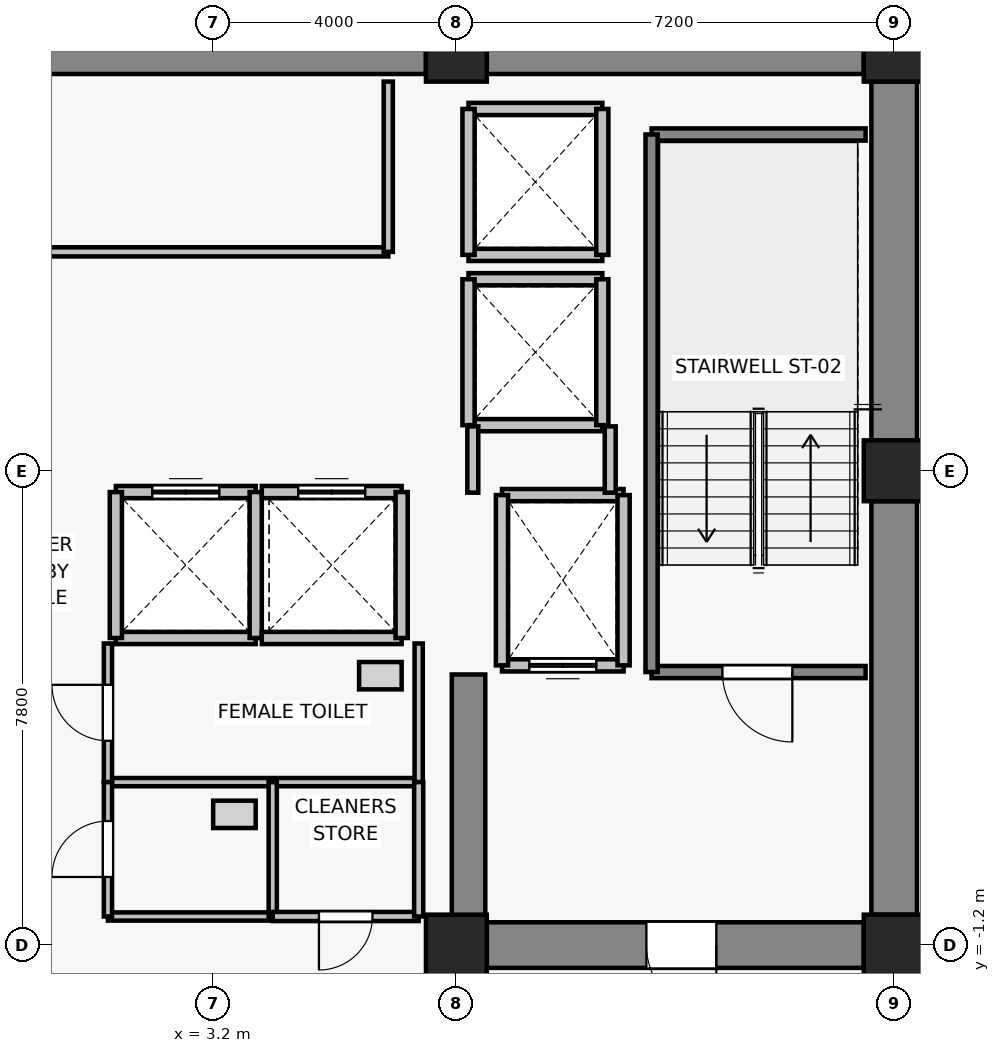
"""IFC4 building model, lengths in metres.
Left out: names, types, materials, properties, quantities, classifications, styles, units other than length and angle.
Written with IfcOpenShell. Run it as: python <this file> out.ifc"""

import sys

from ifc_helpers import new_model, si_unit, direction, frame, frame_2d, origin, origin_2d, place, context, subcontext, project, spatial, rectangle, extrude, source, transform, mapped, element, fill, save


model = new_model("IFC4")
c1 = context("Model", 3, precision=1e-05, world=origin(), true_north=direction((0.0, 1.0)))
c2 = subcontext(c1, "Body", "Model", "MODEL_VIEW")
j1 = project(units=[si_unit("LENGTHUNIT", "METRE"), si_unit("PLANEANGLEUNIT", "RADIAN")], contexts=[c1])
p1 = place(None, origin())
s1 = spatial("IfcSite", under=j1, at=p1, CompositionType="ELEMENT")
p2 = place(p1, origin())
s2 = spatial("IfcBuilding", under=s1, at=p2, CompositionType="ELEMENT")
p3 = place(p2, frame((0.0, 0.0, 169.3)))
s3 = spatial("IfcBuildingStorey", under=s2, at=p3, CompositionType="ELEMENT", Elevation=169.3)
for number, where, z_axis, x_axis in (
    (1, (7.2, -1.2, 0.0), (0.0, 0.0, 1.0), (1.0, 0.0, 0.0)),
    (2, (14.4, -1.2, 0.0), (0.0, 0.0, 1.0), (1.0, 0.0, 0.0)),
    (3, (14.4, 6.6, 0.0), (0.0, 0.0, 1.0), (1.0, 0.0, 0.0)),
    (4, (7.2, 13.5, 0.0), (0.0, 0.0, 1.0), (1.0, 0.0, 0.0)),
    (5, (14.4, 13.5, 0.0), (0.0, 0.0, 1.0), (1.0, 0.0, 0.0)),
):
    element("IfcColumn", number, at=place(p3, frame(where, z_axis=z_axis, x_axis=x_axis)), inside=s3, PredefinedType="COLUMN", context=c2, shape_type="SweptSolid", body=[
        extrude(rectangle(XDim=1.0, YDim=1.0, at=origin_2d()), origin(), (0.0, 0.0, 1.0), 3.3),
    ])
p4 = place(p3, frame((-6.7, 13.5, 0.0), z_axis=(0.0, 0.0, 1.0), x_axis=(1.0, 0.0, 0.0)))
e6 = element("IfcWall", 6, at=p4, inside=s3, PredefinedType="SHEAR", context=c2, shape_type="SweptSolid", body=[
    extrude(rectangle(XDim=13.4, YDim=0.75, at=frame_2d((6.7, 0.0))), origin(), (0.0, 0.0, 1.0), 3.075),
])
p5 = place(p3, frame((7.7, 13.5, 0.0), z_axis=(0.0, 0.0, 1.0), x_axis=(1.0, 0.0, 0.0)))
e7 = element("IfcWall", 7, at=p5, inside=s3, PredefinedType="SHEAR", context=c2, shape_type="SweptSolid", body=[
    extrude(rectangle(XDim=6.2, YDim=0.75, at=frame_2d((3.1, 0.0))), origin(), (0.0, 0.0, 1.0), 3.075),
])
p6 = place(p3, frame((14.4, -0.7, 0.0), z_axis=(0.0, 0.0, 1.0), x_axis=(0.0, 1.0, 0.0)))
e8 = element("IfcWall", 8, at=p6, inside=s3, PredefinedType="SHEAR", context=c2, shape_type="SweptSolid", body=[
    extrude(rectangle(XDim=6.8, YDim=0.75, at=frame_2d((3.4, 0.0))), origin(), (0.0, 0.0, 1.0), 3.075),
])
p7 = place(p3, frame((14.4, 7.1, 0.0), z_axis=(0.0, 0.0, 1.0), x_axis=(0.0, 1.0, 0.0)))
e9 = element("IfcWall", 9, at=p7, inside=s3, PredefinedType="SHEAR", context=c2, shape_type="SweptSolid", body=[
    extrude(rectangle(XDim=5.9, YDim=0.75, at=frame_2d((2.95, 0.0))), origin(), (0.0, 0.0, 1.0), 3.075),
])
p8 = place(p3, frame((13.9, -1.2, 0.0), z_axis=(0.0, 0.0, 1.0), x_axis=(-1.0, 0.0, 0.0)))
e10 = element("IfcWall", 10, at=p8, inside=s3, PredefinedType="SHEAR", context=c2, shape_type="SweptSolid", body=[
    extrude(rectangle(XDim=6.2, YDim=0.75, at=frame_2d((3.1, 0.0))), origin(), (0.0, 0.0, 1.0), 3.075),
])
p9 = place(p8, frame((2.425, 0.0, 0.0)))
e11 = element("IfcOpeningElement", 11, at=p9, cuts=e10, PredefinedType="OPENING", context=c2, shape_type="SweptSolid", body=[
    extrude(rectangle(XDim=1.15, YDim=2.15, at=frame_2d((0.575, 1.075))), frame((0.0, 0.385, 0.0), z_axis=(0.0, -1.0, 0.0), x_axis=(1.0, 0.0, 0.0)), (0.0, 0.0, 1.0), 0.77),
])
p10 = place(p3, frame((7.4, -0.825, 0.0), z_axis=(0.0, 0.0, 1.0), x_axis=(0.0, 1.0, 0.0)))
e12 = element("IfcWall", 12, at=p10, inside=s3, PredefinedType="SHEAR", context=c2, shape_type="SweptSolid", body=[
    extrude(rectangle(XDim=4.075, YDim=0.55, at=frame_2d((2.038, 0.0))), origin(), (0.0, 0.0, 1.0), 3.075),
])
p11 = place(p3, frame((9.95, 3.4, 0.0), z_axis=(0.0, 0.0, 1.0), x_axis=(-1.0, 0.0, 0.0)))
e13 = element("IfcWall", 13, at=p11, inside=s3, PredefinedType="SOLIDWALL", context=c2, shape_type="SweptSolid", body=[
    extrude(rectangle(XDim=2.0, YDim=0.2, at=frame_2d((1.0, 0.0))), origin(), (0.0, 0.0, 1.0), 3.075),
])
p12 = place(p11, frame((0.45, 0.0, 0.0)))
e14 = element("IfcOpeningElement", 14, at=p12, cuts=e13, PredefinedType="OPENING", context=c2, shape_type="SweptSolid", body=[
    extrude(rectangle(XDim=1.1, YDim=2.2, at=frame_2d((0.55, 1.1))), frame((0.0, 0.11, 0.0), z_axis=(0.0, -1.0, 0.0), x_axis=(1.0, 0.0, 0.0)), (0.0, 0.0, 1.0), 0.22),
])
p13 = place(p3, frame((7.95, 6.2, 0.0), z_axis=(0.0, 0.0, 1.0), x_axis=(1.0, 0.0, 0.0)))
e15 = element("IfcWall", 15, at=p13, inside=s3, PredefinedType="SOLIDWALL", context=c2, shape_type="SweptSolid", body=[
    extrude(rectangle(XDim=2.0, YDim=0.2, at=frame_2d((1.0, 0.0))), origin(), (0.0, 0.0, 1.0), 3.075),
])
for number, where, z_axis, x_axis in (
    (16, (7.95, 3.4, 0.0), (0.0, 0.0, 1.0), (0.0, 1.0, 0.0)),
    (17, (9.95, 6.2, 0.0), (0.0, 0.0, 1.0), (0.0, -1.0, 0.0)),
):
    element("IfcWall", number, at=place(p3, frame(where, z_axis=z_axis, x_axis=x_axis)), inside=s3, PredefinedType="SOLIDWALL", context=c2, shape_type="SweptSolid", body=[
        extrude(rectangle(XDim=2.8, YDim=0.2, at=frame_2d((1.4, 0.0))), origin(), (0.0, 0.0, 1.0), 3.075),
    ])
p14 = place(p3, frame((3.9, 3.85, 0.0), z_axis=(0.0, 0.0, 1.0), x_axis=(-1.0, 0.0, 0.0)))
e18 = element("IfcWall", 18, at=p14, inside=s3, PredefinedType="SOLIDWALL", context=c2, shape_type="SweptSolid", body=[
    extrude(rectangle(XDim=2.3, YDim=0.2, at=frame_2d((1.15, 0.0))), origin(), (0.0, 0.0, 1.0), 3.075),
])
p15 = place(p3, frame((1.6, 6.25, 0.0), z_axis=(0.0, 0.0, 1.0), x_axis=(1.0, 0.0, 0.0)))
e19 = element("IfcWall", 19, at=p15, inside=s3, PredefinedType="SOLIDWALL", context=c2, shape_type="SweptSolid", body=[
    extrude(rectangle(XDim=2.3, YDim=0.2, at=frame_2d((1.15, 0.0))), origin(), (0.0, 0.0, 1.0), 3.075),
])
p16 = place(p15, frame((0.6, 0.0, 0.0)))
e20 = element("IfcOpeningElement", 20, at=p16, cuts=e19, PredefinedType="OPENING", context=c2, shape_type="SweptSolid", body=[
    extrude(rectangle(XDim=1.1, YDim=2.2, at=frame_2d((0.55, 1.1))), frame((0.0, 0.11, 0.0), z_axis=(0.0, -1.0, 0.0), x_axis=(1.0, 0.0, 0.0)), (0.0, 0.0, 1.0), 0.22),
])
for number, where, z_axis, x_axis in (
    (21, (1.6, 3.85, 0.0), (0.0, 0.0, 1.0), (0.0, 1.0, 0.0)),
    (22, (3.9, 6.25, 0.0), (0.0, 0.0, 1.0), (0.0, -1.0, 0.0)),
):
    element("IfcWall", number, at=place(p3, frame(where, z_axis=z_axis, x_axis=x_axis)), inside=s3, PredefinedType="SOLIDWALL", context=c2, shape_type="SweptSolid", body=[
        extrude(rectangle(XDim=2.4, YDim=0.2, at=frame_2d((1.2, 0.0))), origin(), (0.0, 0.0, 1.0), 3.075),
    ])
p17 = place(p3, frame((6.3, 3.85, 0.0), z_axis=(0.0, 0.0, 1.0), x_axis=(-1.0, 0.0, 0.0)))
e23 = element("IfcWall", 23, at=p17, inside=s3, PredefinedType="SOLIDWALL", context=c2, shape_type="SweptSolid", body=[
    extrude(rectangle(XDim=2.3, YDim=0.2, at=frame_2d((1.15, 0.0))), origin(), (0.0, 0.0, 1.0), 3.075),
])
p18 = place(p3, frame((4.0, 6.25, 0.0), z_axis=(0.0, 0.0, 1.0), x_axis=(1.0, 0.0, 0.0)))
e24 = element("IfcWall", 24, at=p18, inside=s3, PredefinedType="SOLIDWALL", context=c2, shape_type="SweptSolid", body=[
    extrude(rectangle(XDim=2.3, YDim=0.2, at=frame_2d((1.15, 0.0))), origin(), (0.0, 0.0, 1.0), 3.075),
])
p19 = place(p18, frame((0.6, 0.0, 0.0)))
e25 = element("IfcOpeningElement", 25, at=p19, cuts=e24, PredefinedType="OPENING", context=c2, shape_type="SweptSolid", body=[
    extrude(rectangle(XDim=1.1, YDim=2.2, at=frame_2d((0.55, 1.1))), frame((0.0, 0.11, 0.0), z_axis=(0.0, -1.0, 0.0), x_axis=(1.0, 0.0, 0.0)), (0.0, 0.0, 1.0), 0.22),
])
p20 = place(p3, frame((6.3, 6.25, 0.0), z_axis=(0.0, 0.0, 1.0), x_axis=(0.0, -1.0, 0.0)))
e26 = element("IfcWall", 26, at=p20, inside=s3, PredefinedType="SOLIDWALL", context=c2, shape_type="SweptSolid", body=[
    extrude(rectangle(XDim=2.4, YDim=0.2, at=frame_2d((1.2, 0.0))), origin(), (0.0, 0.0, 1.0), 3.075),
])
for number, where, z_axis, x_axis in (
    (27, (9.6, 7.35, 0.0), (0.0, 0.0, 1.0), (-1.0, 0.0, 0.0)),
    (28, (7.4, 9.75, 0.0), (0.0, 0.0, 1.0), (1.0, 0.0, 0.0)),
):
    element("IfcWall", number, at=place(p3, frame(where, z_axis=z_axis, x_axis=x_axis)), inside=s3, PredefinedType="SOLIDWALL", context=c2, shape_type="SweptSolid", body=[
        extrude(rectangle(XDim=2.2, YDim=0.2, at=frame_2d((1.1, 0.0))), origin(), (0.0, 0.0, 1.0), 2.565),
    ])
p21 = place(p3, frame((7.4, 7.35, 0.0), z_axis=(0.0, 0.0, 1.0), x_axis=(0.0, 1.0, 0.0)))
e29 = element("IfcWall", 29, at=p21, inside=s3, PredefinedType="SOLIDWALL", context=c2, shape_type="SweptSolid", body=[
    extrude(rectangle(XDim=2.4, YDim=0.2, at=frame_2d((1.2, 0.0))), origin(), (0.0, 0.0, 1.0), 2.565),
])
p22 = place(p3, frame((9.6, 9.75, 0.0), z_axis=(0.0, 0.0, 1.0), x_axis=(0.0, -1.0, 0.0)))
e30 = element("IfcWall", 30, at=p22, inside=s3, PredefinedType="SOLIDWALL", context=c2, shape_type="SweptSolid", body=[
    extrude(rectangle(XDim=2.4, YDim=0.2, at=frame_2d((1.2, 0.0))), origin(), (0.0, 0.0, 1.0), 3.075),
])
for number, where, z_axis, x_axis in (
    (31, (9.6, 10.15, 0.0), (0.0, 0.0, 1.0), (-1.0, 0.0, 0.0)),
    (32, (7.4, 12.55, 0.0), (0.0, 0.0, 1.0), (1.0, 0.0, 0.0)),
):
    element("IfcWall", number, at=place(p3, frame(where, z_axis=z_axis, x_axis=x_axis)), inside=s3, PredefinedType="SOLIDWALL", context=c2, shape_type="SweptSolid", body=[
        extrude(rectangle(XDim=2.2, YDim=0.2, at=frame_2d((1.1, 0.0))), origin(), (0.0, 0.0, 1.0), 2.565),
    ])
p23 = place(p3, frame((7.4, 10.15, 0.0), z_axis=(0.0, 0.0, 1.0), x_axis=(0.0, 1.0, 0.0)))
e33 = element("IfcWall", 33, at=p23, inside=s3, PredefinedType="SOLIDWALL", context=c2, shape_type="SweptSolid", body=[
    extrude(rectangle(XDim=2.4, YDim=0.2, at=frame_2d((1.2, 0.0))), origin(), (0.0, 0.0, 1.0), 2.565),
])
p24 = place(p3, frame((9.6, 12.55, 0.0), z_axis=(0.0, 0.0, 1.0), x_axis=(0.0, -1.0, 0.0)))
e34 = element("IfcWall", 34, at=p24, inside=s3, PredefinedType="SOLIDWALL", context=c2, shape_type="SweptSolid", body=[
    extrude(rectangle(XDim=2.4, YDim=0.2, at=frame_2d((1.2, 0.0))), origin(), (0.0, 0.0, 1.0), 3.075),
])
p25 = place(p3, frame((13.93, 3.29, 0.0), z_axis=(0.0, 0.0, 1.0), x_axis=(-1.0, 0.0, 0.0)))
e35 = element("IfcWall", 35, at=p25, inside=s3, PredefinedType="SOLIDWALL", context=c2, shape_type="SweptSolid", body=[
    extrude(rectangle(XDim=3.52, YDim=0.2, at=frame_2d((1.76, 0.0))), origin(), (0.0, 0.0, 1.0), 3.075),
])
p26 = place(p25, frame((1.205, 0.0, 0.0)))
e36 = element("IfcOpeningElement", 36, at=p26, cuts=e35, PredefinedType="OPENING", context=c2, shape_type="SweptSolid", body=[
    extrude(rectangle(XDim=1.15, YDim=2.15, at=frame_2d((0.575, 1.075))), frame((0.0, 0.11, 0.0), z_axis=(0.0, -1.0, 0.0), x_axis=(1.0, 0.0, 0.0)), (0.0, 0.0, 1.0), 0.22),
])
p27 = place(p3, frame((10.41, 12.13, 0.0), z_axis=(0.0, 0.0, 1.0), x_axis=(1.0, 0.0, 0.0)))
e37 = element("IfcWall", 37, at=p27, inside=s3, PredefinedType="SOLIDWALL", context=c2, shape_type="SweptSolid", body=[
    extrude(rectangle(XDim=3.52, YDim=0.2, at=frame_2d((1.76, 0.0))), origin(), (0.0, 0.0, 1.0), 3.075),
])
p28 = place(p3, frame((10.41, 3.29, 0.0), z_axis=(0.0, 0.0, 1.0), x_axis=(0.0, 1.0, 0.0)))
e38 = element("IfcWall", 38, at=p28, inside=s3, PredefinedType="SOLIDWALL", context=c2, shape_type="SweptSolid", body=[
    extrude(rectangle(XDim=8.84, YDim=0.2, at=frame_2d((4.42, 0.0))), origin(), (0.0, 0.0, 1.0), 3.075),
])
p29 = place(p3, frame((7.47, 6.24, 0.0), z_axis=(0.0, 0.0, 1.0), x_axis=(0.0, 1.0, 0.0)))
e39 = element("IfcWall", 39, at=p29, inside=s3, PredefinedType="PARTITIONING", context=c2, shape_type="SweptSolid", body=[
    extrude(rectangle(XDim=1.09, YDim=0.18, at=frame_2d((0.545, 0.0))), origin(), (0.0, 0.0, 1.0), 2.565),
])
p30 = place(p3, frame((9.73, 7.33, 0.0), z_axis=(0.0, 0.0, 1.0), x_axis=(0.0, -1.0, 0.0)))
e40 = element("IfcWall", 40, at=p30, inside=s3, PredefinedType="PARTITIONING", context=c2, shape_type="SweptSolid", body=[
    extrude(rectangle(XDim=1.09, YDim=0.18, at=frame_2d((0.545, 0.0))), origin(), (0.0, 0.0, 1.0), 3.075),
])
p31 = place(p3, frame((6.08, 10.2, 0.0), z_axis=(0.0, 0.0, 1.0), x_axis=(-1.0, 0.0, 0.0)))
e41 = element("IfcWall", 41, at=p31, inside=s3, PredefinedType="PARTITIONING", context=c2, shape_type="SweptSolid", body=[
    extrude(rectangle(XDim=12.16, YDim=0.15, at=frame_2d((6.08, 0.0))), origin(), (0.0, 0.0, 1.0), 3.075),
])
p32 = place(p31, frame((7.005, 0.0, 0.0)))
e42 = element("IfcOpeningElement", 42, at=p32, cuts=e41, PredefinedType="OPENING", context=c2, shape_type="SweptSolid", body=[
    extrude(rectangle(XDim=1.15, YDim=2.15, at=frame_2d((0.575, 1.075))), frame((0.0, 0.085, 0.0), z_axis=(0.0, -1.0, 0.0), x_axis=(1.0, 0.0, 0.0)), (0.0, 0.0, 1.0), 0.17),
])
p33 = place(p3, frame((6.08, 13.0, 0.0), z_axis=(0.0, 0.0, 1.0), x_axis=(0.0, -1.0, 0.0)))
e43 = element("IfcWall", 43, at=p33, inside=s3, PredefinedType="PARTITIONING", context=c2, shape_type="SweptSolid", body=[
    extrude(rectangle(XDim=2.8, YDim=0.15, at=frame_2d((1.4, 0.0))), origin(), (0.0, 0.0, 1.0), 3.075),
])
p34 = place(p3, frame((6.58, 1.48, 0.0), z_axis=(0.0, 0.0, 1.0), x_axis=(-1.0, 0.0, 0.0)))
e44 = element("IfcWall", 44, at=p34, inside=s3, PredefinedType="PARTITIONING", context=c2, shape_type="SweptSolid", body=[
    extrude(rectangle(XDim=5.11, YDim=0.135, at=frame_2d((2.555, 0.0))), origin(), (0.0, 0.0, 1.0), 3.075),
])
p35 = place(p3, frame((1.47, 1.48, 0.0), z_axis=(0.0, 0.0, 1.0), x_axis=(0.0, 1.0, 0.0)))
e45 = element("IfcWall", 45, at=p35, inside=s3, PredefinedType="PARTITIONING", context=c2, shape_type="SweptSolid", body=[
    extrude(rectangle(XDim=2.28, YDim=0.135, at=frame_2d((1.14, 0.0))), origin(), (0.0, 0.0, 1.0), 3.075),
])
p36 = place(p35, frame((0.68, 0.0, 0.0)))
e46 = element("IfcOpeningElement", 46, at=p36, cuts=e45, PredefinedType="OPENING", context=c2, shape_type="SweptSolid", body=[
    extrude(rectangle(XDim=0.92, YDim=2.1, at=frame_2d((0.46, 1.05))), frame((0.0, 0.077, 0.0), z_axis=(0.0, -1.0, 0.0), x_axis=(1.0, 0.0, 0.0)), (0.0, 0.0, 1.0), 0.155),
])
p37 = place(p3, frame((6.58, 3.76, 0.0), z_axis=(0.0, 0.0, 1.0), x_axis=(0.0, -1.0, 0.0)))
e47 = element("IfcWall", 47, at=p37, inside=s3, PredefinedType="PARTITIONING", context=c2, shape_type="SweptSolid", body=[
    extrude(rectangle(XDim=2.28, YDim=0.135, at=frame_2d((1.14, 0.0))), origin(), (0.0, 0.0, 1.0), 3.075),
])
p38 = place(p3, frame((4.18, -0.73, 0.0), z_axis=(0.0, 0.0, 1.0), x_axis=(-1.0, 0.0, 0.0)))
e48 = element("IfcWall", 48, at=p38, inside=s3, PredefinedType="PARTITIONING", context=c2, shape_type="SweptSolid", body=[
    extrude(rectangle(XDim=2.71, YDim=0.135, at=frame_2d((1.355, 0.0))), origin(), (0.0, 0.0, 1.0), 3.075),
])
p39 = place(p3, frame((1.47, -0.73, 0.0), z_axis=(0.0, 0.0, 1.0), x_axis=(0.0, 1.0, 0.0)))
e49 = element("IfcWall", 49, at=p39, inside=s3, PredefinedType="PARTITIONING", context=c2, shape_type="SweptSolid", body=[
    extrude(rectangle(XDim=2.21, YDim=0.135, at=frame_2d((1.105, 0.0))), origin(), (0.0, 0.0, 1.0), 3.075),
])
p40 = place(p39, frame((0.65, 0.0, 0.0)))
e50 = element("IfcOpeningElement", 50, at=p40, cuts=e49, PredefinedType="OPENING", context=c2, shape_type="SweptSolid", body=[
    extrude(rectangle(XDim=0.92, YDim=2.1, at=frame_2d((0.46, 1.05))), frame((0.0, 0.077, 0.0), z_axis=(0.0, -1.0, 0.0), x_axis=(1.0, 0.0, 0.0)), (0.0, 0.0, 1.0), 0.155),
])
p41 = place(p3, frame((4.18, 1.48, 0.0), z_axis=(0.0, 0.0, 1.0), x_axis=(0.0, -1.0, 0.0)))
e51 = element("IfcWall", 51, at=p41, inside=s3, PredefinedType="PARTITIONING", context=c2, shape_type="SweptSolid", body=[
    extrude(rectangle(XDim=2.21, YDim=0.135, at=frame_2d((1.105, 0.0))), origin(), (0.0, 0.0, 1.0), 3.075),
])
p42 = place(p3, frame((6.58, -0.73, 0.0), z_axis=(0.0, 0.0, 1.0), x_axis=(-1.0, 0.0, 0.0)))
e52 = element("IfcWall", 52, at=p42, inside=s3, PredefinedType="PARTITIONING", context=c2, shape_type="SweptSolid", body=[
    extrude(rectangle(XDim=2.4, YDim=0.15, at=frame_2d((1.2, 0.0))), origin(), (0.0, 0.0, 1.0), 3.075),
])
p43 = place(p42, frame((0.76, 0.0, 0.0)))
e53 = element("IfcOpeningElement", 53, at=p43, cuts=e52, PredefinedType="OPENING", context=c2, shape_type="SweptSolid", body=[
    extrude(rectangle(XDim=0.88, YDim=2.1, at=frame_2d((0.44, 1.05))), frame((0.0, 0.085, 0.0), z_axis=(0.0, -1.0, 0.0), x_axis=(1.0, 0.0, 0.0)), (0.0, 0.0, 1.0), 0.17),
])
p44 = place(p3, frame((6.58, 1.48, 0.0), z_axis=(0.0, 0.0, 1.0), x_axis=(0.0, -1.0, 0.0)))
e54 = element("IfcWall", 54, at=p44, inside=s3, PredefinedType="PARTITIONING", context=c2, shape_type="SweptSolid", body=[
    extrude(rectangle(XDim=2.21, YDim=0.15, at=frame_2d((1.105, 0.0))), origin(), (0.0, 0.0, 1.0), 3.075),
])
m1 = source(origin(), c2, "Body", "SweptSolid", [
    extrude(rectangle(XDim=1.1, YDim=2.2, at=frame_2d((0.55, 1.1))), frame((0.0, 0.025, 0.0), z_axis=(0.0, -1.0, 0.0), x_axis=(1.0, 0.0, 0.0)), (0.0, 0.0, 1.0), 0.05),
])
p45 = place(p12, origin())
e55 = element("IfcDoor", 55, at=p45, inside=s3, OperationType="DOUBLE_DOOR_SLIDING", PredefinedType="DOOR", context=c2, shape_type="MappedRepresentation", body=[
    mapped(m1, transform((0.0, 0.0, 0.0), x_axis=(1.0, 0.0, 0.0), y_axis=(0.0, 1.0, 0.0), z_axis=(0.0, 0.0, 1.0), scale=1.0)),
])
fill(e14, e55)
p46 = place(p16, origin())
e56 = element("IfcDoor", 56, at=p46, inside=s3, OperationType="DOUBLE_DOOR_SLIDING", PredefinedType="DOOR", context=c2, shape_type="MappedRepresentation", body=[
    mapped(m1, transform((0.0, 0.0, 0.0), x_axis=(1.0, 0.0, 0.0), y_axis=(0.0, 1.0, 0.0), z_axis=(0.0, 0.0, 1.0), scale=1.0)),
])
fill(e20, e56)
p47 = place(p19, origin())
e57 = element("IfcDoor", 57, at=p47, inside=s3, OperationType="DOUBLE_DOOR_SLIDING", PredefinedType="DOOR", context=c2, shape_type="MappedRepresentation", body=[
    mapped(m1, transform((0.0, 0.0, 0.0), x_axis=(1.0, 0.0, 0.0), y_axis=(0.0, 1.0, 0.0), z_axis=(0.0, 0.0, 1.0), scale=1.0)),
])
fill(e25, e57)
m2 = source(origin(), c2, "Body", "SweptSolid", [
    extrude(rectangle(XDim=1.15, YDim=2.15, at=frame_2d((0.575, 1.075))), frame((0.0, 0.025, 0.0), z_axis=(0.0, -1.0, 0.0), x_axis=(1.0, 0.0, 0.0)), (0.0, 0.0, 1.0), 0.05),
])
p48 = place(p26, origin())
e58 = element("IfcDoor", 58, at=p48, inside=s3, OperationType="SINGLE_SWING_LEFT", PredefinedType="DOOR", context=c2, shape_type="MappedRepresentation", body=[
    mapped(m2, transform((0.0, 0.0, 0.0), x_axis=(1.0, 0.0, 0.0), y_axis=(0.0, 1.0, 0.0), z_axis=(0.0, 0.0, 1.0), scale=1.0)),
])
fill(e36, e58)
p49 = place(p9, origin())
e59 = element("IfcDoor", 59, at=p49, inside=s3, OperationType="SINGLE_SWING_LEFT", PredefinedType="DOOR", context=c2, shape_type="MappedRepresentation", body=[
    mapped(m2, transform((0.0, 0.0, 0.0), x_axis=(1.0, 0.0, 0.0), y_axis=(0.0, 1.0, 0.0), z_axis=(0.0, 0.0, 1.0), scale=1.0)),
])
fill(e11, e59)
m3 = source(origin(), c2, "Body", "SweptSolid", [
    extrude(rectangle(XDim=0.92, YDim=2.1, at=frame_2d((0.46, 1.05))), frame((0.0, 0.025, 0.0), z_axis=(0.0, -1.0, 0.0), x_axis=(1.0, 0.0, 0.0)), (0.0, 0.0, 1.0), 0.05),
])
p50 = place(p36, origin())
e60 = element("IfcDoor", 60, at=p50, inside=s3, OperationType="SINGLE_SWING_RIGHT", PredefinedType="DOOR", context=c2, shape_type="MappedRepresentation", body=[
    mapped(m3, transform((0.0, 0.0, 0.0), x_axis=(1.0, 0.0, 0.0), y_axis=(0.0, 1.0, 0.0), z_axis=(0.0, 0.0, 1.0), scale=1.0)),
])
fill(e46, e60)
p51 = place(p40, origin())
e61 = element("IfcDoor", 61, at=p51, inside=s3, OperationType="SINGLE_SWING_LEFT", PredefinedType="DOOR", context=c2, shape_type="MappedRepresentation", body=[
    mapped(m3, transform((0.0, 0.0, 0.0), x_axis=(1.0, 0.0, 0.0), y_axis=(0.0, 1.0, 0.0), z_axis=(0.0, 0.0, 1.0), scale=1.0)),
])
fill(e50, e61)
m4 = source(origin(), c2, "Body", "SweptSolid", [
    extrude(rectangle(XDim=0.88, YDim=2.1, at=frame_2d((0.44, 1.05))), frame((0.0, 0.025, 0.0), z_axis=(0.0, -1.0, 0.0), x_axis=(1.0, 0.0, 0.0)), (0.0, 0.0, 1.0), 0.05),
])
p52 = place(p43, origin())
e62 = element("IfcDoor", 62, at=p52, inside=s3, OperationType="SINGLE_SWING_RIGHT", PredefinedType="DOOR", context=c2, shape_type="MappedRepresentation", body=[
    mapped(m4, transform((0.0, 0.0, 0.0), x_axis=(1.0, 0.0, 0.0), y_axis=(0.0, 1.0, 0.0), z_axis=(0.0, 0.0, 1.0), scale=1.0)),
])
fill(e53, e62)
save(model, sys.argv[1])
